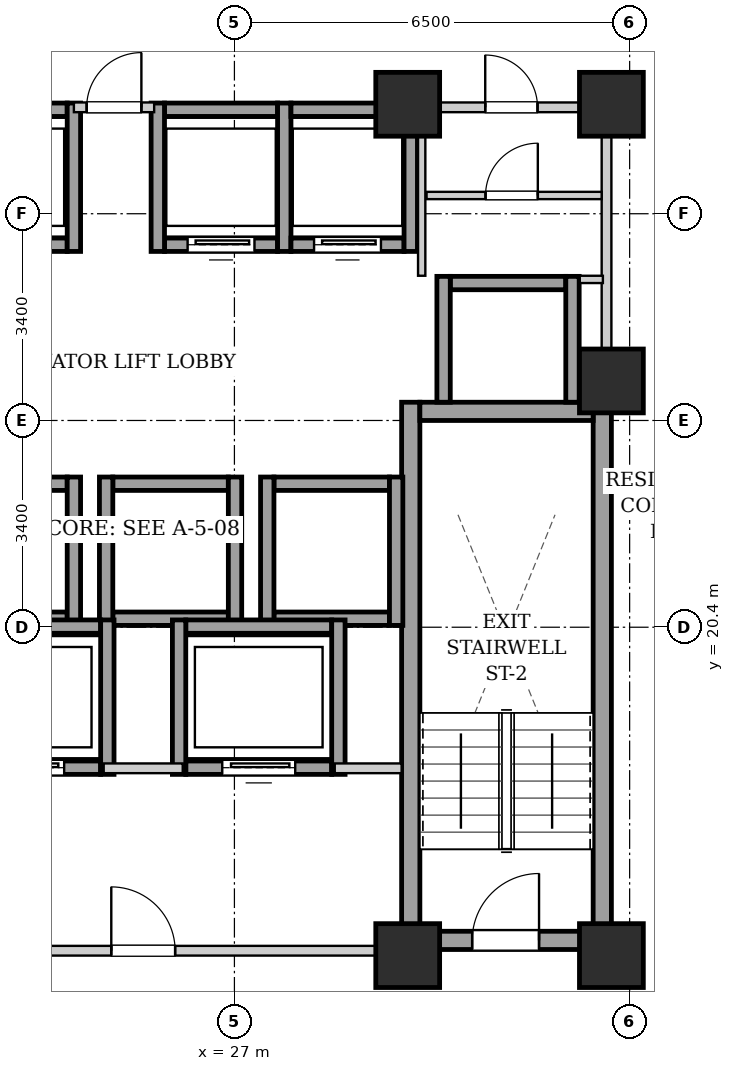
"""IFC4 building model, lengths in metres.
Left out: names, types, materials, properties, quantities, classifications, styles, units other than length and angle.
Written with IfcOpenShell. Run it as: python <this file> out.ifc"""

import sys

from ifc_helpers import new_model, si_unit, direction, frame, frame_2d, origin, origin_2d, place, context, subcontext, project, spatial, rectangle, extrude, element, fill, save


model = new_model("IFC4")
c1 = context("Model", 3, precision=1e-05, world=origin(), true_north=direction((0.0, 1.0)))
c2 = subcontext(c1, "Body", "Model", "MODEL_VIEW")
j1 = project(units=[si_unit("LENGTHUNIT", "METRE"), si_unit("PLANEANGLEUNIT", "RADIAN")], contexts=[c1])
p1 = place(None, origin())
s1 = spatial("IfcSite", under=j1, at=p1, CompositionType="ELEMENT")
p2 = place(p1, origin())
s2 = spatial("IfcBuilding", under=s1, at=p2, CompositionType="ELEMENT")
p3 = place(p2, frame((0.0, 0.0, 116.7)))
s3 = spatial("IfcBuildingStorey", under=s2, at=p3, CompositionType="ELEMENT", Elevation=116.7)
for number, where, z_axis, x_axis in (
    (1, (29.85, 15.0, 0.0), (0.0, 0.0, 1.0), (1.0, 0.0, 0.0)),
    (2, (33.2, 15.0, 0.0), (0.0, 0.0, 1.0), (1.0, 0.0, 0.0)),
    (3, (29.85, 29.0, 0.0), (0.0, 0.0, 1.0), (1.0, 0.0, 0.0)),
    (4, (33.2, 29.0, 0.0), (0.0, 0.0, 1.0), (1.0, 0.0, 0.0)),
    (5, (33.2, 24.45, 0.0), (0.0, 0.0, 1.0), (1.0, 0.0, 0.0)),
):
    element("IfcColumn", number, at=place(p3, frame(where, z_axis=z_axis, x_axis=x_axis)), inside=s3, PredefinedType="COLUMN", context=c2, shape_type="SweptSolid", body=[
        extrude(rectangle(XDim=1.05, YDim=1.05, at=origin_2d()), origin(), (0.0, 0.0, 1.0), 3.2),
    ])
for number, where, z_axis, x_axis in (
    (6, (29.9, 15.1, 0.0), (0.0, 0.0, 1.0), (0.0, 1.0, 0.0)),
    (7, (33.05, 15.1, 0.0), (0.0, 0.0, 1.0), (0.0, 1.0, 0.0)),
):
    element("IfcWall", number, at=place(p3, frame(where, z_axis=z_axis, x_axis=x_axis)), inside=s3, PredefinedType="SHEAR", context=c2, shape_type="SweptSolid", body=[
        extrude(rectangle(XDim=9.0, YDim=0.3, at=frame_2d((4.5, 0.0))), origin(), (0.0, 0.0, 1.0), 2.88),
    ])
p4 = place(p3, frame((30.05, 23.95, 0.0), z_axis=(0.0, 0.0, 1.0), x_axis=(1.0, 0.0, 0.0)))
e8 = element("IfcWall", 8, at=p4, inside=s3, PredefinedType="SHEAR", context=c2, shape_type="SweptSolid", body=[
    extrude(rectangle(XDim=2.85, YDim=0.3, at=frame_2d((1.425, 0.0))), origin(), (0.0, 0.0, 1.0), 2.88),
])
p5 = place(p3, frame((30.05, 15.25, 0.0), z_axis=(0.0, 0.0, 1.0), x_axis=(1.0, 0.0, 0.0)))
e9 = element("IfcWall", 9, at=p5, inside=s3, PredefinedType="SHEAR", context=c2, shape_type="SweptSolid", body=[
    extrude(rectangle(XDim=2.85, YDim=0.3, at=frame_2d((1.425, 0.0))), origin(), (0.0, 0.0, 1.0), 2.88),
])
p6 = place(p5, frame((0.86, 0.0, 0.0)))
e10 = element("IfcOpeningElement", 10, at=p6, cuts=e9, PredefinedType="OPENING", context=c2, shape_type="SweptSolid", body=[
    extrude(rectangle(XDim=1.1, YDim=2.05, at=frame_2d((0.55, 1.025))), frame((0.0, 0.16, 0.0), z_axis=(0.0, -1.0, 0.0), x_axis=(1.0, 0.0, 0.0)), (0.0, 0.0, 1.0), 0.32),
])
p7 = place(p3, frame((22.35, 26.69, 0.0), z_axis=(0.0, 0.0, 1.0), x_axis=(1.0, 0.0, 0.0)))
e11 = element("IfcWall", 11, at=p7, inside=s3, PredefinedType="SHEAR", context=c2, shape_type="SweptSolid", body=[
    extrude(rectangle(XDim=1.9, YDim=0.22, at=frame_2d((0.95, 0.0))), origin(), (0.0, 0.0, 1.0), 2.88),
])
p8 = place(p7, frame((0.4, 0.0, 0.0)))
e12 = element("IfcOpeningElement", 12, at=p8, cuts=e11, PredefinedType="OPENING", context=c2, shape_type="SweptSolid", body=[
    extrude(rectangle(XDim=1.1, YDim=2.15, at=frame_2d((0.55, 1.075))), frame((0.0, 0.12, 0.0), z_axis=(0.0, -1.0, 0.0), x_axis=(1.0, 0.0, 0.0)), (0.0, 0.0, 1.0), 0.24),
])
p9 = place(p3, frame((22.35, 28.91, 0.0), z_axis=(0.0, 0.0, 1.0), x_axis=(1.0, 0.0, 0.0)))
e13 = element("IfcWall", 13, at=p9, inside=s3, PredefinedType="SHEAR", context=c2, shape_type="SweptSolid", body=[
    extrude(rectangle(XDim=1.9, YDim=0.22, at=frame_2d((0.95, 0.0))), origin(), (0.0, 0.0, 1.0), 2.88),
])
p10 = place(p3, frame((24.36, 26.58, 0.0), z_axis=(0.0, 0.0, 1.0), x_axis=(0.0, 1.0, 0.0)))
e14 = element("IfcWall", 14, at=p10, inside=s3, PredefinedType="SHEAR", context=c2, shape_type="SweptSolid", body=[
    extrude(rectangle(XDim=2.44, YDim=0.22, at=frame_2d((1.22, 0.0))), origin(), (0.0, 0.0, 1.0), 2.88),
])
p11 = place(p3, frame((25.85, 26.69, 0.0), z_axis=(0.0, 0.0, 1.0), x_axis=(1.0, 0.0, 0.0)))
e15 = element("IfcWall", 15, at=p11, inside=s3, PredefinedType="SHEAR", context=c2, shape_type="SweptSolid", body=[
    extrude(rectangle(XDim=1.86, YDim=0.22, at=frame_2d((0.93, 0.0))), origin(), (0.0, 0.0, 1.0), 2.88),
])
p12 = place(p11, frame((0.38, 0.0, 0.0)))
e16 = element("IfcOpeningElement", 16, at=p12, cuts=e15, PredefinedType="OPENING", context=c2, shape_type="SweptSolid", body=[
    extrude(rectangle(XDim=1.1, YDim=2.15, at=frame_2d((0.55, 1.075))), frame((0.0, 0.12, 0.0), z_axis=(0.0, -1.0, 0.0), x_axis=(1.0, 0.0, 0.0)), (0.0, 0.0, 1.0), 0.24),
])
p13 = place(p3, frame((25.85, 28.91, 0.0), z_axis=(0.0, 0.0, 1.0), x_axis=(1.0, 0.0, 0.0)))
e17 = element("IfcWall", 17, at=p13, inside=s3, PredefinedType="SHEAR", context=c2, shape_type="SweptSolid", body=[
    extrude(rectangle(XDim=1.86, YDim=0.22, at=frame_2d((0.93, 0.0))), origin(), (0.0, 0.0, 1.0), 2.88),
])
for number, where, z_axis, x_axis in (
    (18, (25.74, 26.58, 0.0), (0.0, 0.0, 1.0), (0.0, 1.0, 0.0)),
    (19, (27.82, 26.58, 0.0), (0.0, 0.0, 1.0), (0.0, 1.0, 0.0)),
):
    element("IfcWall", number, at=place(p3, frame(where, z_axis=z_axis, x_axis=x_axis)), inside=s3, PredefinedType="SHEAR", context=c2, shape_type="SweptSolid", body=[
        extrude(rectangle(XDim=2.44, YDim=0.22, at=frame_2d((1.22, 0.0))), origin(), (0.0, 0.0, 1.0), 2.88),
    ])
p14 = place(p3, frame((27.93, 26.69, 0.0), z_axis=(0.0, 0.0, 1.0), x_axis=(1.0, 0.0, 0.0)))
e20 = element("IfcWall", 20, at=p14, inside=s3, PredefinedType="SHEAR", context=c2, shape_type="SweptSolid", body=[
    extrude(rectangle(XDim=1.86, YDim=0.22, at=frame_2d((0.93, 0.0))), origin(), (0.0, 0.0, 1.0), 2.88),
])
p15 = place(p14, frame((0.38, 0.0, 0.0)))
e21 = element("IfcOpeningElement", 21, at=p15, cuts=e20, PredefinedType="OPENING", context=c2, shape_type="SweptSolid", body=[
    extrude(rectangle(XDim=1.1, YDim=2.15, at=frame_2d((0.55, 1.075))), frame((0.0, 0.12, 0.0), z_axis=(0.0, -1.0, 0.0), x_axis=(1.0, 0.0, 0.0)), (0.0, 0.0, 1.0), 0.24),
])
p16 = place(p3, frame((27.93, 28.91, 0.0), z_axis=(0.0, 0.0, 1.0), x_axis=(1.0, 0.0, 0.0)))
e22 = element("IfcWall", 22, at=p16, inside=s3, PredefinedType="SHEAR", context=c2, shape_type="SweptSolid", body=[
    extrude(rectangle(XDim=1.86, YDim=0.22, at=frame_2d((0.93, 0.0))), origin(), (0.0, 0.0, 1.0), 2.88),
])
p17 = place(p3, frame((29.9, 26.58, 0.0), z_axis=(0.0, 0.0, 1.0), x_axis=(0.0, 1.0, 0.0)))
e23 = element("IfcWall", 23, at=p17, inside=s3, PredefinedType="SHEAR", context=c2, shape_type="SweptSolid", body=[
    extrude(rectangle(XDim=2.44, YDim=0.22, at=frame_2d((1.22, 0.0))), origin(), (0.0, 0.0, 1.0), 2.88),
])
for number, where, z_axis, x_axis in (
    (24, (22.35, 20.54, 0.0), (0.0, 0.0, 1.0), (1.0, 0.0, 0.0)),
    (25, (22.35, 22.76, 0.0), (0.0, 0.0, 1.0), (1.0, 0.0, 0.0)),
):
    element("IfcWall", number, at=place(p3, frame(where, z_axis=z_axis, x_axis=x_axis)), inside=s3, PredefinedType="SHEAR", context=c2, shape_type="SweptSolid", body=[
        extrude(rectangle(XDim=1.9, YDim=0.22, at=frame_2d((0.95, 0.0))), origin(), (0.0, 0.0, 1.0), 2.88),
    ])
p18 = place(p3, frame((24.36, 20.43, 0.0), z_axis=(0.0, 0.0, 1.0), x_axis=(0.0, 1.0, 0.0)))
e26 = element("IfcWall", 26, at=p18, inside=s3, PredefinedType="SHEAR", context=c2, shape_type="SweptSolid", body=[
    extrude(rectangle(XDim=2.44, YDim=0.22, at=frame_2d((1.22, 0.0))), origin(), (0.0, 0.0, 1.0), 2.88),
])
for number, where, z_axis, x_axis in (
    (27, (25.0, 20.54, 0.0), (0.0, 0.0, 1.0), (1.0, 0.0, 0.0)),
    (28, (25.0, 22.76, 0.0), (0.0, 0.0, 1.0), (1.0, 0.0, 0.0)),
):
    element("IfcWall", number, at=place(p3, frame(where, z_axis=z_axis, x_axis=x_axis)), inside=s3, PredefinedType="SHEAR", context=c2, shape_type="SweptSolid", body=[
        extrude(rectangle(XDim=1.9, YDim=0.22, at=frame_2d((0.95, 0.0))), origin(), (0.0, 0.0, 1.0), 2.88),
    ])
for number, where, z_axis, x_axis in (
    (29, (24.89, 20.43, 0.0), (0.0, 0.0, 1.0), (0.0, 1.0, 0.0)),
    (30, (27.01, 20.43, 0.0), (0.0, 0.0, 1.0), (0.0, 1.0, 0.0)),
):
    element("IfcWall", number, at=place(p3, frame(where, z_axis=z_axis, x_axis=x_axis)), inside=s3, PredefinedType="SHEAR", context=c2, shape_type="SweptSolid", body=[
        extrude(rectangle(XDim=2.44, YDim=0.22, at=frame_2d((1.22, 0.0))), origin(), (0.0, 0.0, 1.0), 2.88),
    ])
for number, where, z_axis, x_axis in (
    (31, (27.65, 20.54, 0.0), (0.0, 0.0, 1.0), (1.0, 0.0, 0.0)),
    (32, (27.65, 22.76, 0.0), (0.0, 0.0, 1.0), (1.0, 0.0, 0.0)),
):
    element("IfcWall", number, at=place(p3, frame(where, z_axis=z_axis, x_axis=x_axis)), inside=s3, PredefinedType="SHEAR", context=c2, shape_type="SweptSolid", body=[
        extrude(rectangle(XDim=1.9, YDim=0.22, at=frame_2d((0.95, 0.0))), origin(), (0.0, 0.0, 1.0), 2.88),
    ])
for number, where, z_axis, x_axis in (
    (33, (27.54, 20.43, 0.0), (0.0, 0.0, 1.0), (0.0, 1.0, 0.0)),
    (34, (29.66, 20.43, 0.0), (0.0, 0.0, 1.0), (0.0, 1.0, 0.0)),
):
    element("IfcWall", number, at=place(p3, frame(where, z_axis=z_axis, x_axis=x_axis)), inside=s3, PredefinedType="SHEAR", context=c2, shape_type="SweptSolid", body=[
        extrude(rectangle(XDim=2.44, YDim=0.22, at=frame_2d((1.22, 0.0))), origin(), (0.0, 0.0, 1.0), 2.88),
    ])
p19 = place(p3, frame((30.55, 26.06, 0.0), z_axis=(0.0, 0.0, 1.0), x_axis=(1.0, 0.0, 0.0)))
e35 = element("IfcWall", 35, at=p19, inside=s3, PredefinedType="SHEAR", context=c2, shape_type="SweptSolid", body=[
    extrude(rectangle(XDim=1.9, YDim=0.22, at=frame_2d((0.95, 0.0))), origin(), (0.0, 0.0, 1.0), 2.88),
])
for number, where, z_axis, x_axis in (
    (36, (30.44, 24.1, 0.0), (0.0, 0.0, 1.0), (0.0, 1.0, 0.0)),
    (37, (32.56, 24.1, 0.0), (0.0, 0.0, 1.0), (0.0, 1.0, 0.0)),
):
    element("IfcWall", number, at=place(p3, frame(where, z_axis=z_axis, x_axis=x_axis)), inside=s3, PredefinedType="SHEAR", context=c2, shape_type="SweptSolid", body=[
        extrude(rectangle(XDim=2.07, YDim=0.22, at=frame_2d((1.035, 0.0))), origin(), (0.0, 0.0, 1.0), 2.88),
    ])
p20 = place(p3, frame((22.4, 18.09, 0.0), z_axis=(0.0, 0.0, 1.0), x_axis=(1.0, 0.0, 0.0)))
e38 = element("IfcWall", 38, at=p20, inside=s3, PredefinedType="SHEAR", context=c2, shape_type="SweptSolid", body=[
    extrude(rectangle(XDim=2.4, YDim=0.22, at=frame_2d((1.2, 0.0))), origin(), (0.0, 0.0, 1.0), 2.88),
])
p21 = place(p20, frame((0.6, 0.0, 0.0)))
e39 = element("IfcOpeningElement", 39, at=p21, cuts=e38, PredefinedType="OPENING", context=c2, shape_type="SweptSolid", body=[
    extrude(rectangle(XDim=1.2, YDim=2.15, at=frame_2d((0.6, 1.075))), frame((0.0, 0.12, 0.0), z_axis=(0.0, -1.0, 0.0), x_axis=(1.0, 0.0, 0.0)), (0.0, 0.0, 1.0), 0.24),
])
p22 = place(p3, frame((22.4, 20.41, 0.0), z_axis=(0.0, 0.0, 1.0), x_axis=(1.0, 0.0, 0.0)))
e40 = element("IfcWall", 40, at=p22, inside=s3, PredefinedType="SHEAR", context=c2, shape_type="SweptSolid", body=[
    extrude(rectangle(XDim=2.4, YDim=0.22, at=frame_2d((1.2, 0.0))), origin(), (0.0, 0.0, 1.0), 2.88),
])
p23 = place(p3, frame((24.91, 17.98, 0.0), z_axis=(0.0, 0.0, 1.0), x_axis=(0.0, 1.0, 0.0)))
e41 = element("IfcWall", 41, at=p23, inside=s3, PredefinedType="SHEAR", context=c2, shape_type="SweptSolid", body=[
    extrude(rectangle(XDim=2.54, YDim=0.22, at=frame_2d((1.27, 0.0))), origin(), (0.0, 0.0, 1.0), 2.88),
])
p24 = place(p3, frame((26.2, 18.09, 0.0), z_axis=(0.0, 0.0, 1.0), x_axis=(1.0, 0.0, 0.0)))
e42 = element("IfcWall", 42, at=p24, inside=s3, PredefinedType="SHEAR", context=c2, shape_type="SweptSolid", body=[
    extrude(rectangle(XDim=2.4, YDim=0.22, at=frame_2d((1.2, 0.0))), origin(), (0.0, 0.0, 1.0), 2.88),
])
p25 = place(p24, frame((0.6, 0.0, 0.0)))
e43 = element("IfcOpeningElement", 43, at=p25, cuts=e42, PredefinedType="OPENING", context=c2, shape_type="SweptSolid", body=[
    extrude(rectangle(XDim=1.2, YDim=2.15, at=frame_2d((0.6, 1.075))), frame((0.0, 0.12, 0.0), z_axis=(0.0, -1.0, 0.0), x_axis=(1.0, 0.0, 0.0)), (0.0, 0.0, 1.0), 0.24),
])
p26 = place(p3, frame((26.2, 20.41, 0.0), z_axis=(0.0, 0.0, 1.0), x_axis=(1.0, 0.0, 0.0)))
e44 = element("IfcWall", 44, at=p26, inside=s3, PredefinedType="SHEAR", context=c2, shape_type="SweptSolid", body=[
    extrude(rectangle(XDim=2.4, YDim=0.22, at=frame_2d((1.2, 0.0))), origin(), (0.0, 0.0, 1.0), 2.88),
])
for number, where, z_axis, x_axis in (
    (45, (26.09, 17.98, 0.0), (0.0, 0.0, 1.0), (0.0, 1.0, 0.0)),
    (46, (28.71, 17.98, 0.0), (0.0, 0.0, 1.0), (0.0, 1.0, 0.0)),
):
    element("IfcWall", number, at=place(p3, frame(where, z_axis=z_axis, x_axis=x_axis)), inside=s3, PredefinedType="SHEAR", context=c2, shape_type="SweptSolid", body=[
        extrude(rectangle(XDim=2.54, YDim=0.22, at=frame_2d((1.27, 0.0))), origin(), (0.0, 0.0, 1.0), 2.88),
    ])
p27 = place(p3, frame((21.25, 15.08, 0.0), z_axis=(0.0, 0.0, 1.0), x_axis=(1.0, 0.0, 0.0)))
e47 = element("IfcWall", 47, at=p27, inside=s3, PredefinedType="PARTITIONING", context=c2, shape_type="SweptSolid", body=[
    extrude(rectangle(XDim=8.5, YDim=0.16, at=frame_2d((4.25, 0.0))), origin(), (0.0, 0.0, 1.0), 2.253),
])
p28 = place(p27, frame((3.725, 0.0, 0.0)))
e48 = element("IfcOpeningElement", 48, at=p28, cuts=e47, PredefinedType="OPENING", context=c2, shape_type="SweptSolid", body=[
    extrude(rectangle(XDim=1.05, YDim=2.05, at=frame_2d((0.525, 1.025))), frame((0.0, 0.09, 0.0), z_axis=(0.0, -1.0, 0.0), x_axis=(1.0, 0.0, 0.0)), (0.0, 0.0, 1.0), 0.18),
])
p29 = place(p3, frame((24.85, 18.08, 0.0), z_axis=(0.0, 0.0, 1.0), x_axis=(1.0, 0.0, 0.0)))
e49 = element("IfcWall", 49, at=p29, inside=s3, PredefinedType="PARTITIONING", context=c2, shape_type="SweptSolid", body=[
    extrude(rectangle(XDim=1.3, YDim=0.16, at=frame_2d((0.65, 0.0))), origin(), (0.0, 0.0, 1.0), 2.88),
])
p30 = place(p3, frame((28.65, 18.08, 0.0), z_axis=(0.0, 0.0, 1.0), x_axis=(1.0, 0.0, 0.0)))
e50 = element("IfcWall", 50, at=p30, inside=s3, PredefinedType="PARTITIONING", context=c2, shape_type="SweptSolid", body=[
    extrude(rectangle(XDim=1.1, YDim=0.16, at=frame_2d((0.55, 0.0))), origin(), (0.0, 0.0, 1.0), 2.88),
])
p31 = place(p3, frame((33.12, 24.12, 0.0), z_axis=(0.0, 0.0, 1.0), x_axis=(0.0, 1.0, 0.0)))
e51 = element("IfcWall", 51, at=p31, inside=s3, PredefinedType="PARTITIONING", context=c2, shape_type="SweptSolid", body=[
    extrude(rectangle(XDim=4.76, YDim=0.16, at=frame_2d((2.38, 0.0))), origin(), (0.0, 0.0, 1.0), 2.215),
])
p32 = place(p3, frame((24.36, 28.95, 0.0), z_axis=(0.0, 0.0, 1.0), x_axis=(1.0, 0.0, 0.0)))
e52 = element("IfcWall", 52, at=p32, inside=s3, PredefinedType="PARTITIONING", context=c2, shape_type="SweptSolid", body=[
    extrude(rectangle(XDim=1.32, YDim=0.16, at=frame_2d((0.66, 0.0))), origin(), (0.0, 0.0, 1.0), 2.253),
])
p33 = place(p32, frame((0.21, 0.0, 0.0)))
e53 = element("IfcOpeningElement", 53, at=p33, cuts=e52, PredefinedType="OPENING", context=c2, shape_type="SweptSolid", body=[
    extrude(rectangle(XDim=0.9, YDim=2.05, at=frame_2d((0.45, 1.025))), frame((0.0, 0.09, 0.0), z_axis=(0.0, -1.0, 0.0), x_axis=(1.0, 0.0, 0.0)), (0.0, 0.0, 1.0), 0.18),
])
p34 = place(p3, frame((30.08, 26.18, 0.0), z_axis=(0.0, 0.0, 1.0), x_axis=(0.0, 1.0, 0.0)))
e54 = element("IfcWall", 54, at=p34, inside=s3, PredefinedType="PARTITIONING", context=c2, shape_type="SweptSolid", body=[
    extrude(rectangle(XDim=2.68, YDim=0.12, at=frame_2d((1.34, 0.0))), origin(), (0.0, 0.0, 1.0), 2.88),
])
p35 = place(p3, frame((32.68, 26.12, 0.0), z_axis=(0.0, 0.0, 1.0), x_axis=(1.0, 0.0, 0.0)))
e55 = element("IfcWall", 55, at=p35, inside=s3, PredefinedType="PARTITIONING", context=c2, shape_type="SweptSolid", body=[
    extrude(rectangle(XDim=0.38, YDim=0.12, at=frame_2d((0.19, 0.0))), origin(), (0.0, 0.0, 1.0), 2.88),
])
p36 = place(p3, frame((30.16, 27.5, 0.0), z_axis=(0.0, 0.0, 1.0), x_axis=(1.0, 0.0, 0.0)))
e56 = element("IfcWall", 56, at=p36, inside=s3, PredefinedType="PARTITIONING", context=c2, shape_type="SweptSolid", body=[
    extrude(rectangle(XDim=2.88, YDim=0.12, at=frame_2d((1.44, 0.0))), origin(), (0.0, 0.0, 1.0), 2.88),
])
p37 = place(p36, frame((0.97, 0.0, 0.0)))
e57 = element("IfcOpeningElement", 57, at=p37, cuts=e56, PredefinedType="OPENING", context=c2, shape_type="SweptSolid", body=[
    extrude(rectangle(XDim=0.86, YDim=2.05, at=frame_2d((0.43, 1.025))), frame((0.0, 0.07, 0.0), z_axis=(0.0, -1.0, 0.0), x_axis=(1.0, 0.0, 0.0)), (0.0, 0.0, 1.0), 0.14),
])
p38 = place(p3, frame((30.08, 28.95, 0.0), z_axis=(0.0, 0.0, 1.0), x_axis=(1.0, 0.0, 0.0)))
e58 = element("IfcWall", 58, at=p38, inside=s3, PredefinedType="PARTITIONING", context=c2, shape_type="SweptSolid", body=[
    extrude(rectangle(XDim=2.96, YDim=0.16, at=frame_2d((1.48, 0.0))), origin(), (0.0, 0.0, 1.0), 2.88),
])
p39 = place(p38, frame((1.045, 0.0, 0.0)))
e59 = element("IfcOpeningElement", 59, at=p39, cuts=e58, PredefinedType="OPENING", context=c2, shape_type="SweptSolid", body=[
    extrude(rectangle(XDim=0.86, YDim=2.05, at=frame_2d((0.43, 1.025))), frame((0.0, 0.09, 0.0), z_axis=(0.0, -1.0, 0.0), x_axis=(1.0, 0.0, 0.0)), (0.0, 0.0, 1.0), 0.18),
])
p40 = place(p6, origin())
e60 = element("IfcDoor", 60, at=p40, inside=s3, OperationType="SINGLE_SWING_RIGHT", PredefinedType="DOOR", context=c2, shape_type="SweptSolid", body=[
    extrude(rectangle(XDim=1.1, YDim=2.05, at=frame_2d((0.55, 1.025))), frame((0.0, 0.025, 0.0), z_axis=(0.0, -1.0, 0.0), x_axis=(1.0, 0.0, 0.0)), (0.0, 0.0, 1.0), 0.05),
])
fill(e10, e60)
p41 = place(p12, origin())
e61 = element("IfcDoor", 61, at=p41, inside=s3, OperationType="SLIDING_TO_LEFT", PredefinedType="DOOR", context=c2, shape_type="SweptSolid", body=[
    extrude(rectangle(XDim=1.1, YDim=2.15, at=frame_2d((0.55, 1.075))), frame((0.0, 0.025, 0.0), z_axis=(0.0, -1.0, 0.0), x_axis=(1.0, 0.0, 0.0)), (0.0, 0.0, 1.0), 0.05),
])
fill(e16, e61)
p42 = place(p15, origin())
e62 = element("IfcDoor", 62, at=p42, inside=s3, OperationType="SLIDING_TO_LEFT", PredefinedType="DOOR", context=c2, shape_type="SweptSolid", body=[
    extrude(rectangle(XDim=1.1, YDim=2.15, at=frame_2d((0.55, 1.075))), frame((0.0, 0.025, 0.0), z_axis=(0.0, -1.0, 0.0), x_axis=(1.0, 0.0, 0.0)), (0.0, 0.0, 1.0), 0.05),
])
fill(e21, e62)
p43 = place(p21, origin())
e63 = element("IfcDoor", 63, at=p43, inside=s3, OperationType="SLIDING_TO_LEFT", PredefinedType="DOOR", context=c2, shape_type="SweptSolid", body=[
    extrude(rectangle(XDim=1.2, YDim=2.15, at=frame_2d((0.6, 1.075))), frame((0.0, 0.025, 0.0), z_axis=(0.0, -1.0, 0.0), x_axis=(1.0, 0.0, 0.0)), (0.0, 0.0, 1.0), 0.05),
])
fill(e39, e63)
p44 = place(p25, origin())
e64 = element("IfcDoor", 64, at=p44, inside=s3, OperationType="SLIDING_TO_LEFT", PredefinedType="DOOR", context=c2, shape_type="SweptSolid", body=[
    extrude(rectangle(XDim=1.2, YDim=2.15, at=frame_2d((0.6, 1.075))), frame((0.0, 0.025, 0.0), z_axis=(0.0, -1.0, 0.0), x_axis=(1.0, 0.0, 0.0)), (0.0, 0.0, 1.0), 0.05),
])
fill(e43, e64)
p45 = place(p28, origin())
e65 = element("IfcDoor", 65, at=p45, inside=s3, OperationType="SINGLE_SWING_LEFT", PredefinedType="DOOR", context=c2, shape_type="SweptSolid", body=[
    extrude(rectangle(XDim=1.05, YDim=2.05, at=frame_2d((0.525, 1.025))), frame((0.0, 0.025, 0.0), z_axis=(0.0, -1.0, 0.0), x_axis=(1.0, 0.0, 0.0)), (0.0, 0.0, 1.0), 0.05),
])
fill(e48, e65)
p46 = place(p33, origin())
e66 = element("IfcDoor", 66, at=p46, inside=s3, OperationType="SINGLE_SWING_RIGHT", PredefinedType="DOOR", context=c2, shape_type="SweptSolid", body=[
    extrude(rectangle(XDim=0.9, YDim=2.05, at=frame_2d((0.45, 1.025))), frame((0.0, 0.025, 0.0), z_axis=(0.0, -1.0, 0.0), x_axis=(1.0, 0.0, 0.0)), (0.0, 0.0, 1.0), 0.05),
])
fill(e53, e66)
p47 = place(p37, origin())
e67 = element("IfcDoor", 67, at=p47, inside=s3, OperationType="SINGLE_SWING_RIGHT", PredefinedType="DOOR", context=c2, shape_type="SweptSolid", body=[
    extrude(rectangle(XDim=0.86, YDim=2.05, at=frame_2d((0.43, 1.025))), frame((0.0, 0.025, 0.0), z_axis=(0.0, -1.0, 0.0), x_axis=(1.0, 0.0, 0.0)), (0.0, 0.0, 1.0), 0.05),
])
fill(e57, e67)
p48 = place(p39, origin())
e68 = element("IfcDoor", 68, at=p48, inside=s3, OperationType="SINGLE_SWING_LEFT", PredefinedType="DOOR", context=c2, shape_type="SweptSolid", body=[
    extrude(rectangle(XDim=0.86, YDim=2.05, at=frame_2d((0.43, 1.025))), frame((0.0, 0.025, 0.0), z_axis=(0.0, -1.0, 0.0), x_axis=(1.0, 0.0, 0.0)), (0.0, 0.0, 1.0), 0.05),
])
fill(e59, e68)
save(model, sys.argv[1])
